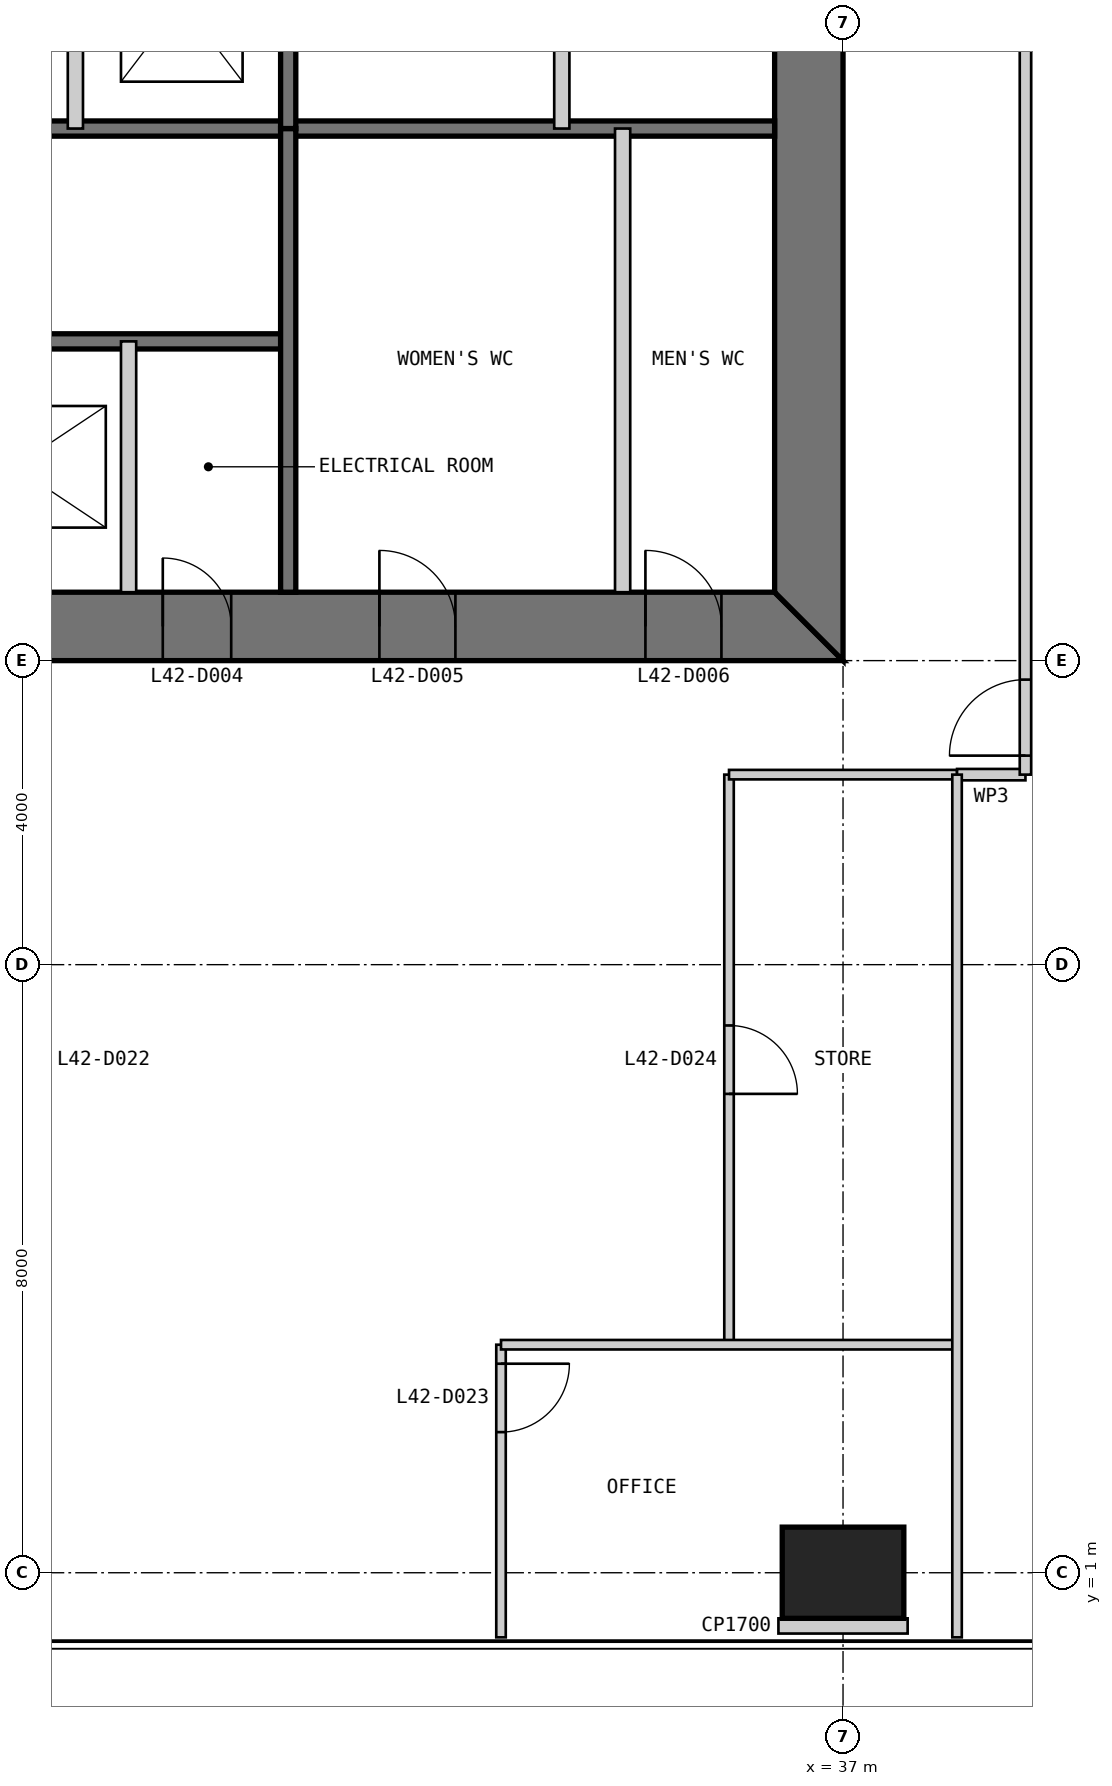
"""IFC4 building model, lengths in metres.
Left out: names, types, materials, properties, quantities, classifications, styles, units other than length and angle.
Written with IfcOpenShell. Run it as: python <this file> out.ifc"""

import sys

from ifc_helpers import new_model, si_unit, direction, frame, frame_2d, origin, origin_2d, place, context, subcontext, project, spatial, polyline, rectangle, outline, extrude, element, fill, save


model = new_model("IFC4")
c1 = context("Model", 3, precision=1e-05, world=origin(), true_north=direction((0.0, 1.0)))
c2 = subcontext(c1, "Body", "Model", "MODEL_VIEW")
j1 = project(units=[si_unit("LENGTHUNIT", "METRE"), si_unit("PLANEANGLEUNIT", "RADIAN")], contexts=[c1])
p1 = place(None, origin())
s1 = spatial("IfcSite", under=j1, at=p1, CompositionType="ELEMENT")
p2 = place(p1, origin())
s2 = spatial("IfcBuilding", under=s1, at=p2, CompositionType="ELEMENT")
p3 = place(p2, frame((0.0, 0.0, 181.8)))
s3 = spatial("IfcBuildingStorey", under=s2, at=p3, CompositionType="ELEMENT", Elevation=181.8)
p4 = place(p3, frame((37.0, 1.0, 0.0), z_axis=(0.0, 0.0, 1.0), x_axis=(1.0, 0.0, 0.0)))
e1 = element("IfcColumn", 1, at=p4, inside=s3, PredefinedType="COLUMN", context=c2, shape_type="SweptSolid", body=[
    extrude(rectangle(XDim=1.6, YDim=1.2, at=origin_2d()), origin(), (0.0, 0.0, 1.0), 4.0),
])
p5 = place(p3, frame((13.0, 13.45, 0.0), z_axis=(0.0, 0.0, 1.0), x_axis=(1.0, 0.0, 0.0)))
e2 = element("IfcWall", 2, at=p5, inside=s3, PredefinedType="SHEAR", context=c2, shape_type="SweptSolid", body=[
    extrude(outline(polyline([(0.0, -0.45), (24.0, -0.45), (23.1, 0.45), (0.9, 0.45), (0.0, -0.45)])), origin(), (0.0, 0.0, 1.0), 4.0),
])
p6 = place(p5, frame((4.9, 0.0, 0.0)))
e3 = element("IfcOpeningElement", 3, at=p6, cuts=e2, PredefinedType="OPENING", context=c2, shape_type="SweptSolid", body=[
    extrude(rectangle(XDim=1.0, YDim=2.2, at=frame_2d((0.5, 1.1))), frame((0.0, 0.46, 0.0), z_axis=(0.0, -1.0, 0.0), x_axis=(1.0, 0.0, 0.0)), (0.0, 0.0, 1.0), 0.92),
])
p7 = place(p5, frame((8.9, 0.0, 0.0)))
e4 = element("IfcOpeningElement", 4, at=p7, cuts=e2, PredefinedType="OPENING", context=c2, shape_type="SweptSolid", body=[
    extrude(rectangle(XDim=1.1, YDim=2.2, at=frame_2d((0.55, 1.1))), frame((0.0, 0.46, 0.0), z_axis=(0.0, -1.0, 0.0), x_axis=(1.0, 0.0, 0.0)), (0.0, 0.0, 1.0), 0.92),
])
p8 = place(p5, frame((15.05, 0.0, 0.0)))
e5 = element("IfcOpeningElement", 5, at=p8, cuts=e2, PredefinedType="OPENING", context=c2, shape_type="SweptSolid", body=[
    extrude(rectangle(XDim=0.9, YDim=2.2, at=frame_2d((0.45, 1.1))), frame((0.0, 0.46, 0.0), z_axis=(0.0, -1.0, 0.0), x_axis=(1.0, 0.0, 0.0)), (0.0, 0.0, 1.0), 0.92),
])
p9 = place(p5, frame((17.9, 0.0, 0.0)))
e6 = element("IfcOpeningElement", 6, at=p9, cuts=e2, PredefinedType="OPENING", context=c2, shape_type="SweptSolid", body=[
    extrude(rectangle(XDim=1.0, YDim=2.2, at=frame_2d((0.5, 1.1))), frame((0.0, 0.46, 0.0), z_axis=(0.0, -1.0, 0.0), x_axis=(1.0, 0.0, 0.0)), (0.0, 0.0, 1.0), 0.92),
])
p10 = place(p5, frame((21.4, 0.0, 0.0)))
e7 = element("IfcOpeningElement", 7, at=p10, cuts=e2, PredefinedType="OPENING", context=c2, shape_type="SweptSolid", body=[
    extrude(rectangle(XDim=1.0, YDim=2.2, at=frame_2d((0.5, 1.1))), frame((0.0, 0.46, 0.0), z_axis=(0.0, -1.0, 0.0), x_axis=(1.0, 0.0, 0.0)), (0.0, 0.0, 1.0), 0.92),
])
p11 = place(p3, frame((36.55, 13.9, 0.0), z_axis=(0.0, 0.0, 1.0), x_axis=(0.0, 1.0, 0.0)))
e8 = element("IfcWall", 8, at=p11, inside=s3, PredefinedType="SHEAR", context=c2, shape_type="SweptSolid", body=[
    extrude(outline(polyline([(-0.9, -0.45), (23.1, -0.45), (22.2, 0.45), (0.0, 0.45), (-0.9, -0.45)])), origin(), (0.0, 0.0, 1.0), 4.0),
])
p12 = place(p11, frame((20.2, 0.0, 0.0)))
e9 = element("IfcOpeningElement", 9, at=p12, cuts=e8, PredefinedType="OPENING", context=c2, shape_type="SweptSolid", body=[
    extrude(rectangle(XDim=1.0, YDim=2.2, at=frame_2d((0.5, 1.1))), frame((0.0, 0.46, 0.0), z_axis=(0.0, -1.0, 0.0), x_axis=(1.0, 0.0, 0.0)), (0.0, 0.0, 1.0), 0.92),
])
p13 = place(p11, frame((17.25, 0.0, 0.0)))
e10 = element("IfcOpeningElement", 10, at=p13, cuts=e8, PredefinedType="OPENING", context=c2, shape_type="SweptSolid", body=[
    extrude(rectangle(XDim=0.9, YDim=2.2, at=frame_2d((0.45, 1.1))), frame((0.0, 0.46, 0.0), z_axis=(0.0, -1.0, 0.0), x_axis=(1.0, 0.0, 0.0)), (0.0, 0.0, 1.0), 0.92),
])
p14 = place(p3, frame((20.3, 17.2, 0.0), z_axis=(0.0, 0.0, 1.0), x_axis=(1.0, 0.0, 0.0)))
e11 = element("IfcWall", 11, at=p14, inside=s3, PredefinedType="SOLIDWALL", context=c2, shape_type="SweptSolid", body=[
    extrude(rectangle(XDim=9.4, YDim=0.2, at=frame_2d((4.7, 0.0))), origin(), (0.0, 0.0, 1.0), 3.8),
])
p15 = place(p14, frame((0.25, 0.0, 0.0)))
e12 = element("IfcOpeningElement", 12, at=p15, cuts=e11, PredefinedType="OPENING", context=c2, shape_type="SweptSolid", body=[
    extrude(rectangle(XDim=1.0, YDim=2.2, at=frame_2d((0.5, 1.1))), frame((0.0, 0.11, 0.0), z_axis=(0.0, -1.0, 0.0), x_axis=(1.0, 0.0, 0.0)), (0.0, 0.0, 1.0), 0.22),
])
p16 = place(p3, frame((20.3, 20.0, 0.0), z_axis=(0.0, 0.0, 1.0), x_axis=(1.0, 0.0, 0.0)))
e13 = element("IfcWall", 13, at=p16, inside=s3, PredefinedType="SOLIDWALL", context=c2, shape_type="SweptSolid", body=[
    extrude(rectangle(XDim=15.8, YDim=0.2, at=frame_2d((7.9, 0.0))), origin(), (0.0, 0.0, 1.0), 3.8),
])
p17 = place(p3, frame((27.6, 13.9, 0.0), z_axis=(0.0, 0.0, 1.0), x_axis=(0.0, 1.0, 0.0)))
e14 = element("IfcWall", 14, at=p17, inside=s3, PredefinedType="PARTITIONING", context=c2, shape_type="SweptSolid", body=[
    extrude(rectangle(XDim=3.3, YDim=0.2, at=frame_2d((1.65, 0.0))), origin(), (0.0, 0.0, 1.0), 3.8),
])
p18 = place(p3, frame((29.7, 13.9, 0.0), z_axis=(0.0, 0.0, 1.0), x_axis=(0.0, 1.0, 0.0)))
e15 = element("IfcWall", 15, at=p18, inside=s3, PredefinedType="SOLIDWALL", context=c2, shape_type="SweptSolid", body=[
    extrude(rectangle(XDim=6.1, YDim=0.2, at=frame_2d((3.05, 0.0))), origin(), (0.0, 0.0, 1.0), 3.8),
])
p19 = place(p3, frame((34.1, 13.9, 0.0), z_axis=(0.0, 0.0, 1.0), x_axis=(0.0, 1.0, 0.0)))
e16 = element("IfcWall", 16, at=p19, inside=s3, PredefinedType="PARTITIONING", context=c2, shape_type="SweptSolid", body=[
    extrude(rectangle(XDim=6.1, YDim=0.2, at=frame_2d((3.05, 0.0))), origin(), (0.0, 0.0, 1.0), 3.8),
])
p20 = place(p3, frame((33.3, 36.1, 0.0), z_axis=(0.0, 0.0, 1.0), x_axis=(0.0, -1.0, 0.0)))
e17 = element("IfcWall", 17, at=p20, inside=s3, PredefinedType="PARTITIONING", context=c2, shape_type="SweptSolid", body=[
    extrude(rectangle(XDim=16.1, YDim=0.2, at=frame_2d((8.05, 0.0))), origin(), (0.0, 0.0, 1.0), 3.8),
])
p21 = place(p3, frame((29.7, 36.1, 0.0), z_axis=(0.0, 0.0, 1.0), x_axis=(0.0, -1.0, 0.0)))
e18 = element("IfcWall", 18, at=p21, inside=s3, PredefinedType="SOLIDWALL", context=c2, shape_type="SweptSolid", body=[
    extrude(rectangle(XDim=16.1, YDim=0.2, at=frame_2d((8.05, 0.0))), origin(), (0.0, 0.0, 1.0), 3.8),
])
p22 = place(p21, frame((7.217, 0.0, 0.0)))
e19 = element("IfcOpeningElement", 19, at=p22, cuts=e18, PredefinedType="OPENING", context=c2, shape_type="SweptSolid", body=[
    extrude(rectangle(XDim=1.1, YDim=2.2, at=frame_2d((0.55, 1.1))), frame((0.0, 0.11, 0.0), z_axis=(0.0, -1.0, 0.0), x_axis=(1.0, 0.0, 0.0)), (0.0, 0.0, 1.0), 0.22),
])
p23 = place(p21, frame((10.55, 0.0, 0.0)))
e20 = element("IfcOpeningElement", 20, at=p23, cuts=e18, PredefinedType="OPENING", context=c2, shape_type="SweptSolid", body=[
    extrude(rectangle(XDim=1.1, YDim=2.2, at=frame_2d((0.55, 1.1))), frame((0.0, 0.11, 0.0), z_axis=(0.0, -1.0, 0.0), x_axis=(1.0, 0.0, 0.0)), (0.0, 0.0, 1.0), 0.22),
])
p24 = place(p21, frame((13.883, 0.0, 0.0)))
e21 = element("IfcOpeningElement", 21, at=p24, cuts=e18, PredefinedType="OPENING", context=c2, shape_type="SweptSolid", body=[
    extrude(rectangle(XDim=1.1, YDim=2.2, at=frame_2d((0.55, 1.1))), frame((0.0, 0.11, 0.0), z_axis=(0.0, -1.0, 0.0), x_axis=(1.0, 0.0, 0.0)), (0.0, 0.0, 1.0), 0.22),
])
p25 = place(p3, frame((26.9, 30.0, 0.0), z_axis=(0.0, 0.0, 1.0), x_axis=(0.0, -1.0, 0.0)))
e22 = element("IfcWall", 22, at=p25, inside=s3, PredefinedType="PARTITIONING", context=c2, shape_type="SweptSolid", body=[
    extrude(rectangle(XDim=10.0, YDim=0.2, at=frame_2d((5.0, 0.0))), origin(), (0.0, 0.0, 1.0), 3.8),
])
p26 = place(p3, frame((32.5, 0.15, 0.0), z_axis=(0.0, 0.0, 1.0), x_axis=(0.0, 1.0, 0.0)))
e23 = element("IfcWall", 23, at=p26, inside=s3, PredefinedType="PARTITIONING", context=c2, shape_type="SweptSolid", body=[
    extrude(rectangle(XDim=3.85, YDim=0.125, at=frame_2d((1.925, 0.0))), origin(), (0.0, 0.0, 1.0), 3.85),
])
p27 = place(p26, frame((2.7, 0.0, 0.0)))
e24 = element("IfcOpeningElement", 24, at=p27, cuts=e23, PredefinedType="OPENING", context=c2, shape_type="SweptSolid", body=[
    extrude(rectangle(XDim=0.9, YDim=2.2, at=frame_2d((0.45, 1.1))), frame((0.0, 0.073, 0.0), z_axis=(0.0, -1.0, 0.0), x_axis=(1.0, 0.0, 0.0)), (0.0, 0.0, 1.0), 0.145),
])
p28 = place(p3, frame((35.5, 4.0, 0.0), z_axis=(0.0, 0.0, 1.0), x_axis=(0.0, 1.0, 0.0)))
e25 = element("IfcWall", 25, at=p28, inside=s3, PredefinedType="PARTITIONING", context=c2, shape_type="SweptSolid", body=[
    extrude(rectangle(XDim=7.5, YDim=0.125, at=frame_2d((3.75, 0.0))), origin(), (0.0, 0.0, 1.0), 3.85),
])
p29 = place(p28, frame((3.3, 0.0, 0.0)))
e26 = element("IfcOpeningElement", 26, at=p29, cuts=e25, PredefinedType="OPENING", context=c2, shape_type="SweptSolid", body=[
    extrude(rectangle(XDim=0.9, YDim=2.2, at=frame_2d((0.45, 1.1))), frame((0.0, 0.073, 0.0), z_axis=(0.0, -1.0, 0.0), x_axis=(1.0, 0.0, 0.0)), (0.0, 0.0, 1.0), 0.145),
])
p30 = place(p3, frame((32.5, 4.0, 0.0), z_axis=(0.0, 0.0, 1.0), x_axis=(1.0, 0.0, 0.0)))
e27 = element("IfcWall", 27, at=p30, inside=s3, PredefinedType="PARTITIONING", context=c2, shape_type="SweptSolid", body=[
    extrude(rectangle(XDim=6.0, YDim=0.125, at=frame_2d((3.0, 0.0))), origin(), (0.0, 0.0, 1.0), 3.85),
])
p31 = place(p3, frame((35.5, 11.5, 0.0), z_axis=(0.0, 0.0, 1.0), x_axis=(1.0, 0.0, 0.0)))
e28 = element("IfcWall", 28, at=p31, inside=s3, PredefinedType="PARTITIONING", context=c2, shape_type="SweptSolid", body=[
    extrude(rectangle(XDim=3.0, YDim=0.125, at=frame_2d((1.5, 0.0))), origin(), (0.0, 0.0, 1.0), 3.85),
])
p32 = place(p3, frame((38.5, 11.5, 0.0), z_axis=(0.0, 0.0, 1.0), x_axis=(1.0, 0.0, 0.0)))
e29 = element("IfcWall", 29, at=p32, inside=s3, PredefinedType="PARTITIONING", context=c2, shape_type="SweptSolid", body=[
    extrude(rectangle(XDim=0.9, YDim=0.15, at=frame_2d((0.45, 0.0))), origin(), (0.0, 0.0, 1.0), 3.85),
])
p33 = place(p3, frame((39.4, 11.5, 0.0), z_axis=(0.0, 0.0, 1.0), x_axis=(0.0, 1.0, 0.0)))
e30 = element("IfcWall", 30, at=p33, inside=s3, PredefinedType="PARTITIONING", context=c2, shape_type="SweptSolid", body=[
    extrude(rectangle(XDim=27.0, YDim=0.15, at=frame_2d((13.5, 0.0))), origin(), (0.0, 0.0, 1.0), 3.85),
])
p34 = place(p33, frame((16.0, 0.0, 0.0)))
e31 = element("IfcOpeningElement", 31, at=p34, cuts=e30, PredefinedType="OPENING", context=c2, shape_type="SweptSolid", body=[
    extrude(rectangle(XDim=1.0, YDim=2.2, at=frame_2d((0.5, 1.1))), frame((0.0, 0.085, 0.0), z_axis=(0.0, -1.0, 0.0), x_axis=(1.0, 0.0, 0.0)), (0.0, 0.0, 1.0), 0.17),
])
p35 = place(p33, frame((0.25, 0.0, 0.0)))
e32 = element("IfcOpeningElement", 32, at=p35, cuts=e30, PredefinedType="OPENING", context=c2, shape_type="SweptSolid", body=[
    extrude(rectangle(XDim=1.0, YDim=2.2, at=frame_2d((0.5, 1.1))), frame((0.0, 0.085, 0.0), z_axis=(0.0, -1.0, 0.0), x_axis=(1.0, 0.0, 0.0)), (0.0, 0.0, 1.0), 0.17),
])
p36 = place(p33, frame((10.75, 0.0, 0.0)))
e33 = element("IfcOpeningElement", 33, at=p36, cuts=e30, PredefinedType="OPENING", context=c2, shape_type="SweptSolid", body=[
    extrude(rectangle(XDim=1.0, YDim=2.2, at=frame_2d((0.5, 1.1))), frame((0.0, 0.085, 0.0), z_axis=(0.0, -1.0, 0.0), x_axis=(1.0, 0.0, 0.0)), (0.0, 0.0, 1.0), 0.17),
])
p37 = place(p33, frame((22.0, 0.0, 0.0)))
e34 = element("IfcOpeningElement", 34, at=p37, cuts=e30, PredefinedType="OPENING", context=c2, shape_type="SweptSolid", body=[
    extrude(rectangle(XDim=1.0, YDim=2.2, at=frame_2d((0.5, 1.1))), frame((0.0, 0.085, 0.0), z_axis=(0.0, -1.0, 0.0), x_axis=(1.0, 0.0, 0.0)), (0.0, 0.0, 1.0), 0.17),
])
p38 = place(p33, frame((25.0, 0.0, 0.0)))
e35 = element("IfcOpeningElement", 35, at=p38, cuts=e30, PredefinedType="OPENING", context=c2, shape_type="SweptSolid", body=[
    extrude(rectangle(XDim=1.0, YDim=2.2, at=frame_2d((0.5, 1.1))), frame((0.0, 0.085, 0.0), z_axis=(0.0, -1.0, 0.0), x_axis=(1.0, 0.0, 0.0)), (0.0, 0.0, 1.0), 0.17),
])
p39 = place(p3, frame((38.5, 0.15, 0.0), z_axis=(0.0, 0.0, 1.0), x_axis=(0.0, 1.0, 0.0)))
e36 = element("IfcWall", 36, at=p39, inside=s3, PredefinedType="PARTITIONING", context=c2, shape_type="SweptSolid", body=[
    extrude(rectangle(XDim=11.35, YDim=0.125, at=frame_2d((5.675, 0.0))), origin(), (0.0, 0.0, 1.0), 3.85),
])
p40 = place(p3, frame((37.0, 0.2, 0.0), z_axis=(0.0, 0.0, 1.0), x_axis=(0.0, 1.0, 0.0)))
e37 = element("IfcWall", 37, at=p40, inside=s3, PredefinedType="PARTITIONING", context=c2, shape_type="SweptSolid", body=[
    extrude(rectangle(XDim=0.2, YDim=1.7, at=frame_2d((0.1, 0.0))), origin(), (0.0, 0.0, 1.0), 3.85),
])
p41 = place(p8, origin())
e38 = element("IfcDoor", 38, at=p41, inside=s3, OperationType="SINGLE_SWING_LEFT", PredefinedType="DOOR", context=c2, shape_type="SweptSolid", body=[
    extrude(rectangle(XDim=0.9, YDim=2.2, at=frame_2d((0.45, 1.1))), frame((0.0, 0.025, 0.0), z_axis=(0.0, -1.0, 0.0), x_axis=(1.0, 0.0, 0.0)), (0.0, 0.0, 1.0), 0.05),
    extrude(outline(polyline([(0.0, 0.0), (0.04, 0.0), (0.04, 2.16), (0.86, 2.16), (0.86, 0.0), (0.9, 0.0), (0.9, 2.2), (0.0, 2.2), (0.0, 0.0)])), frame((0.0, 0.3, 0.0), z_axis=(0.0, -1.0, 0.0), x_axis=(1.0, 0.0, 0.0)), (0.0, 0.0, 1.0), 0.6),
])
fill(e5, e38)
p42 = place(p9, origin())
e39 = element("IfcDoor", 39, at=p42, inside=s3, OperationType="SINGLE_SWING_LEFT", PredefinedType="DOOR", context=c2, shape_type="SweptSolid", body=[
    extrude(rectangle(XDim=1.0, YDim=2.2, at=frame_2d((0.5, 1.1))), frame((0.0, 0.025, 0.0), z_axis=(0.0, -1.0, 0.0), x_axis=(1.0, 0.0, 0.0)), (0.0, 0.0, 1.0), 0.05),
    extrude(outline(polyline([(0.0, 0.0), (0.04, 0.0), (0.04, 2.16), (0.96, 2.16), (0.96, 0.0), (1.0, 0.0), (1.0, 2.2), (0.0, 2.2), (0.0, 0.0)])), frame((0.0, 0.3, 0.0), z_axis=(0.0, -1.0, 0.0), x_axis=(1.0, 0.0, 0.0)), (0.0, 0.0, 1.0), 0.6),
])
fill(e6, e39)
p43 = place(p10, origin())
e40 = element("IfcDoor", 40, at=p43, inside=s3, OperationType="SINGLE_SWING_LEFT", PredefinedType="DOOR", context=c2, shape_type="SweptSolid", body=[
    extrude(rectangle(XDim=1.0, YDim=2.2, at=frame_2d((0.5, 1.1))), frame((0.0, 0.025, 0.0), z_axis=(0.0, -1.0, 0.0), x_axis=(1.0, 0.0, 0.0)), (0.0, 0.0, 1.0), 0.05),
    extrude(outline(polyline([(0.0, 0.0), (0.04, 0.0), (0.04, 2.16), (0.96, 2.16), (0.96, 0.0), (1.0, 0.0), (1.0, 2.2), (0.0, 2.2), (0.0, 0.0)])), frame((0.0, 0.3, 0.0), z_axis=(0.0, -1.0, 0.0), x_axis=(1.0, 0.0, 0.0)), (0.0, 0.0, 1.0), 0.6),
])
fill(e7, e40)
p44 = place(p27, frame((0.9, 0.0, 0.0), z_axis=(0.0, 0.0, 1.0), x_axis=(-1.0, 0.0, 0.0)))
e41 = element("IfcDoor", 41, at=p44, inside=s3, OperationType="SINGLE_SWING_LEFT", PredefinedType="DOOR", context=c2, shape_type="SweptSolid", body=[
    extrude(rectangle(XDim=0.9, YDim=2.2, at=frame_2d((0.45, 1.1))), frame((0.0, 0.025, 0.0), z_axis=(0.0, -1.0, 0.0), x_axis=(1.0, 0.0, 0.0)), (0.0, 0.0, 1.0), 0.05),
])
fill(e24, e41)
p45 = place(p29, frame((0.9, 0.0, 0.0), z_axis=(0.0, 0.0, 1.0), x_axis=(-1.0, 0.0, 0.0)))
e42 = element("IfcDoor", 42, at=p45, inside=s3, OperationType="SINGLE_SWING_RIGHT", PredefinedType="DOOR", context=c2, shape_type="SweptSolid", body=[
    extrude(rectangle(XDim=0.9, YDim=2.2, at=frame_2d((0.45, 1.1))), frame((0.0, 0.025, 0.0), z_axis=(0.0, -1.0, 0.0), x_axis=(1.0, 0.0, 0.0)), (0.0, 0.0, 1.0), 0.05),
])
fill(e26, e42)
p46 = place(p35, origin())
e43 = element("IfcDoor", 43, at=p46, inside=s3, OperationType="SINGLE_SWING_LEFT", PredefinedType="DOOR", context=c2, shape_type="SweptSolid", body=[
    extrude(rectangle(XDim=1.0, YDim=2.2, at=frame_2d((0.5, 1.1))), frame((0.0, 0.025, 0.0), z_axis=(0.0, -1.0, 0.0), x_axis=(1.0, 0.0, 0.0)), (0.0, 0.0, 1.0), 0.05),
])
fill(e32, e43)
save(model, sys.argv[1])
